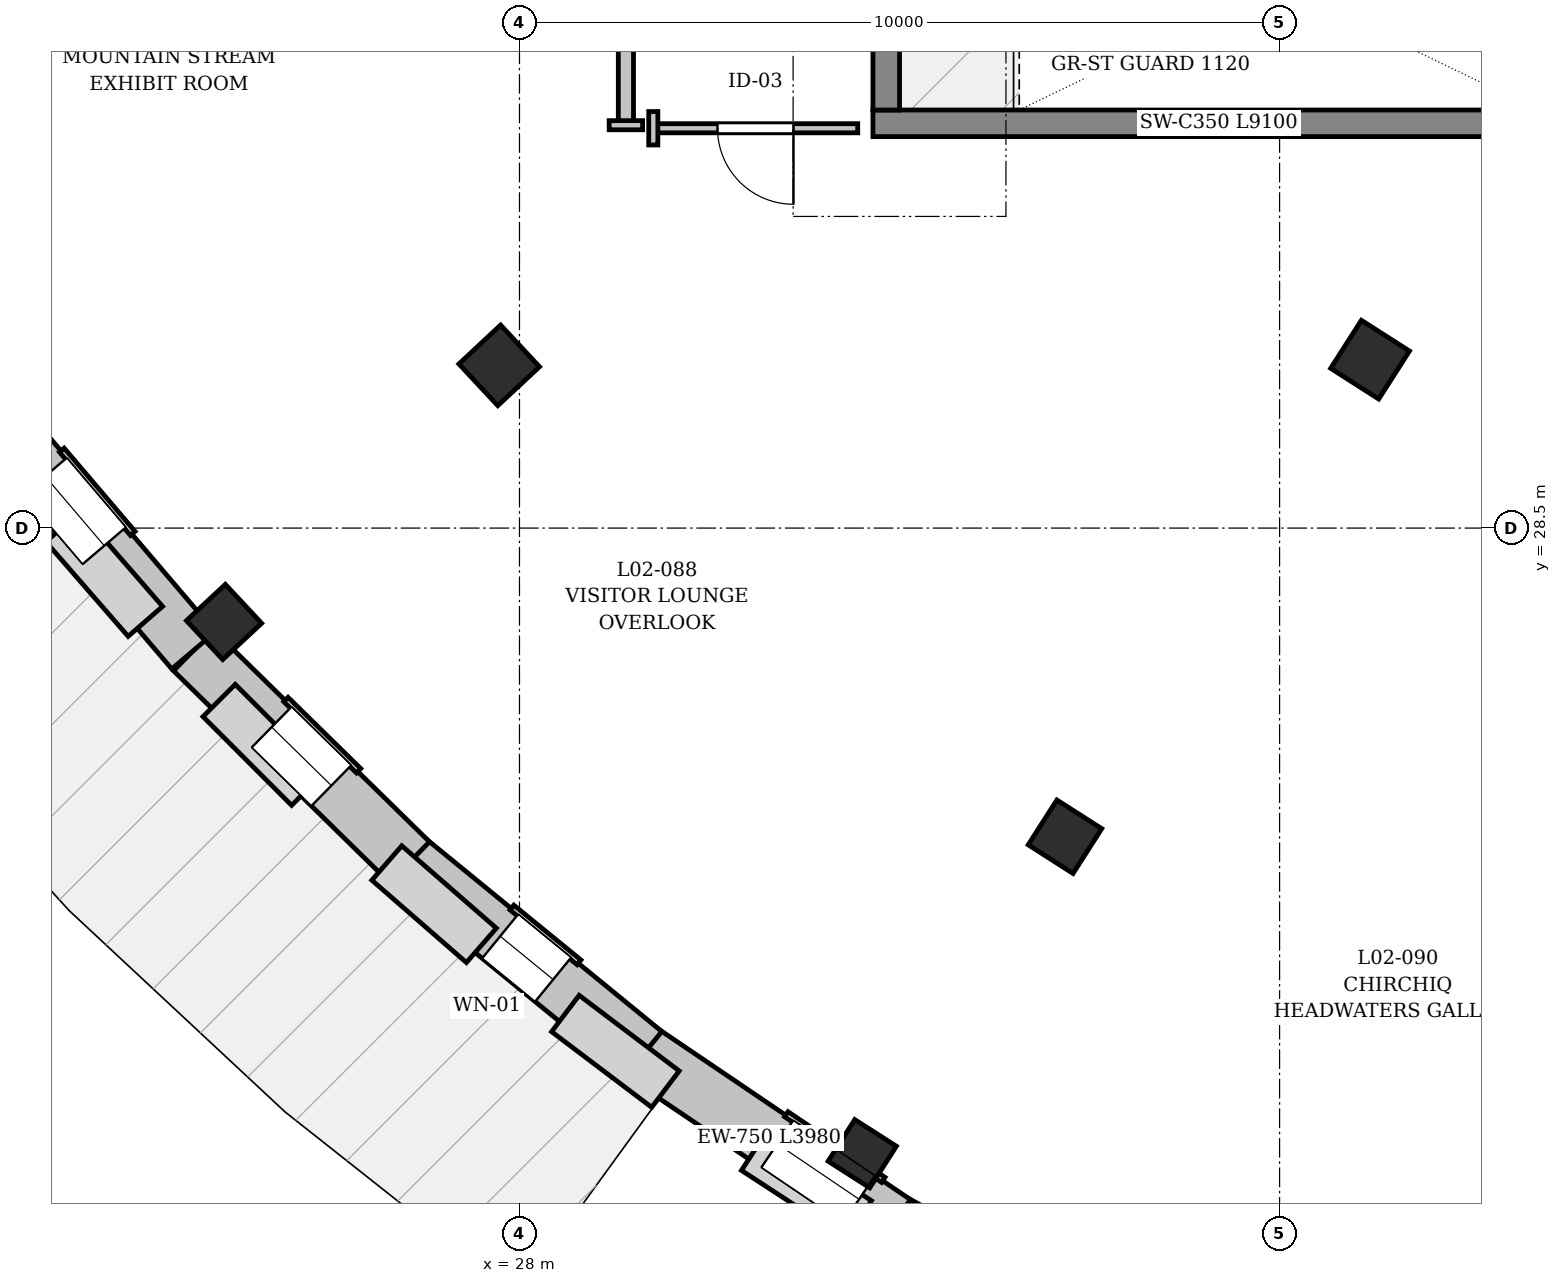
"""IFC4 building model, lengths in metres.
Left out: names, types, materials, properties, quantities, classifications, styles, units other than length and angle.
Written with IfcOpenShell. Run it as: python <this file> out.ifc"""

import sys

from ifc_helpers import new_model, si_unit, direction, frame, frame_2d, origin, origin_2d, place, context, subcontext, project, spatial, rectangle, extrude, element, fill, save


model = new_model("IFC4")
c1 = context("Model", 3, precision=1e-05, world=origin(), true_north=direction((0.0, 1.0)))
c2 = subcontext(c1, "Body", "Model", "MODEL_VIEW")
j1 = project(units=[si_unit("LENGTHUNIT", "METRE"), si_unit("PLANEANGLEUNIT", "RADIAN")], contexts=[c1])
p1 = place(None, origin())
s1 = spatial("IfcSite", under=j1, at=p1, CompositionType="ELEMENT")
p2 = place(p1, origin())
s2 = spatial("IfcBuilding", under=s1, at=p2, CompositionType="ELEMENT")
p3 = place(p2, frame((0.0, 0.0, 5.4)))
s3 = spatial("IfcBuildingStorey", under=s2, at=p3, CompositionType="ELEMENT", Elevation=5.4)
p4 = place(p3, frame((27.733, 30.641, 0.0), z_axis=(0.0, 0.0, 1.0), x_axis=(-0.731353701619, -0.681998360062, 0.0)))
e1 = element("IfcColumn", 1, at=p4, inside=s3, PredefinedType="COLUMN", context=c2, shape_type="SweptSolid", body=[
    extrude(rectangle(XDim=0.75, YDim=0.75, at=origin_2d()), origin(), (0.0, 0.0, 1.0), 4.58),
])
p5 = place(p3, frame((24.113, 27.265, 0.0), z_axis=(0.0, 0.0, 1.0), x_axis=(-0.731353701619, -0.681998360062, 0.0)))
e2 = element("IfcColumn", 2, at=p5, inside=s3, PredefinedType="COLUMN", context=c2, shape_type="SweptSolid", body=[
    extrude(rectangle(XDim=0.7, YDim=0.7, at=origin_2d()), origin(), (0.0, 0.0, 1.0), 4.58),
])
p6 = place(p3, frame((39.19, 30.716, 0.0), z_axis=(0.0, 0.0, 1.0), x_axis=(-0.538770785007, -0.842452397007, 0.0)))
e3 = element("IfcColumn", 3, at=p6, inside=s3, PredefinedType="COLUMN", context=c2, shape_type="SweptSolid", body=[
    extrude(rectangle(XDim=0.75, YDim=0.75, at=origin_2d()), origin(), (0.0, 0.0, 1.0), 4.58),
])
p7 = place(p3, frame((35.177, 24.439, 0.0), z_axis=(0.0, 0.0, 1.0), x_axis=(-0.538770785007, -0.842452397007, 0.0)))
e4 = element("IfcColumn", 4, at=p7, inside=s3, PredefinedType="COLUMN", context=c2, shape_type="SweptSolid", body=[
    extrude(rectangle(XDim=0.7, YDim=0.7, at=origin_2d()), origin(), (0.0, 0.0, 1.0), 4.58),
])
p8 = place(p3, frame((32.51, 20.269, 0.0), z_axis=(0.0, 0.0, 1.0), x_axis=(-0.538770785007, -0.842452397007, 0.0)))
e5 = element("IfcColumn", 5, at=p8, inside=s3, PredefinedType="COLUMN", context=c2, shape_type="SweptSolid", body=[
    extrude(rectangle(XDim=0.65, YDim=0.65, at=origin_2d()), origin(), (0.0, 0.0, 1.0), 4.58),
])
p9 = place(p3, frame((36.416, 17.432, 0.0), z_axis=(0.0, 0.0, 1.0), x_axis=(-0.875332414788, 0.483521626839, 0.0)))
e6 = element("IfcWall", 6, at=p9, inside=s3, PredefinedType="SOLIDWALL", context=c2, shape_type="SweptSolid", body=[
    extrude(rectangle(XDim=3.98, YDim=0.75, at=frame_2d((1.99, 0.0))), origin(), (0.0, 0.0, 1.0), 7.932),
])
p10 = place(p9, frame((1.49, 0.0, 0.75)))
e7 = element("IfcOpeningElement", 7, at=p10, cuts=e6, PredefinedType="OPENING", context=c2, shape_type="SweptSolid", body=[
    extrude(rectangle(XDim=1.0, YDim=2.3, at=frame_2d((0.5, 1.15))), frame((0.0, 0.385, 0.0), z_axis=(0.0, -1.0, 0.0), x_axis=(1.0, 0.0, 0.0)), (0.0, 0.0, 1.0), 0.77),
])
p11 = place(p3, frame((32.932, 19.356, 0.0), z_axis=(0.0, 0.0, 1.0), x_axis=(-0.828246569426, 0.560363828448, 0.0)))
e8 = element("IfcWall", 8, at=p11, inside=s3, PredefinedType="SOLIDWALL", context=c2, shape_type="SweptSolid", body=[
    extrude(rectangle(XDim=3.98, YDim=0.75, at=frame_2d((1.99, 0.0))), origin(), (0.0, 0.0, 1.0), 4.803),
])
p12 = place(p11, frame((0.56, 0.0, 0.75)))
e9 = element("IfcOpeningElement", 9, at=p12, cuts=e8, PredefinedType="OPENING", context=c2, shape_type="SweptSolid", body=[
    extrude(rectangle(XDim=1.3, YDim=2.2, at=frame_2d((0.65, 1.1))), frame((0.0, 0.385, 0.0), z_axis=(0.0, -1.0, 0.0), x_axis=(1.0, 0.0, 0.0)), (0.0, 0.0, 1.0), 0.77),
])
p13 = place(p3, frame((29.635, 21.586, 0.0), z_axis=(0.0, 0.0, 1.0), x_axis=(-0.77437531836, 0.632726533595, 0.0)))
e10 = element("IfcWall", 10, at=p13, inside=s3, PredefinedType="SOLIDWALL", context=c2, shape_type="SweptSolid", body=[
    extrude(rectangle(XDim=3.98, YDim=0.75, at=frame_2d((1.99, 0.0))), origin(), (0.0, 0.0, 1.0), 7.932),
])
p14 = place(p13, frame((1.54, 0.0, 0.75)))
e11 = element("IfcOpeningElement", 11, at=p14, cuts=e10, PredefinedType="OPENING", context=c2, shape_type="SweptSolid", body=[
    extrude(rectangle(XDim=0.9, YDim=2.4, at=frame_2d((0.45, 1.2))), frame((0.0, 0.385, 0.0), z_axis=(0.0, -1.0, 0.0), x_axis=(1.0, 0.0, 0.0)), (0.0, 0.0, 1.0), 0.77),
])
p15 = place(p3, frame((26.554, 24.104, 0.0), z_axis=(0.0, 0.0, 1.0), x_axis=(-0.71427784637, 0.699862242291, 0.0)))
e12 = element("IfcWall", 12, at=p15, inside=s3, PredefinedType="SOLIDWALL", context=c2, shape_type="SweptSolid", body=[
    extrude(rectangle(XDim=3.98, YDim=0.75, at=frame_2d((1.99, 0.0))), origin(), (0.0, 0.0, 1.0), 4.753),
])
p16 = place(p15, frame((1.44, 0.0, 0.75)))
e13 = element("IfcOpeningElement", 13, at=p16, cuts=e12, PredefinedType="OPENING", context=c2, shape_type="SweptSolid", body=[
    extrude(rectangle(XDim=1.1, YDim=2.4, at=frame_2d((0.55, 1.2))), frame((0.0, 0.385, 0.0), z_axis=(0.0, -1.0, 0.0), x_axis=(1.0, 0.0, 0.0)), (0.0, 0.0, 1.0), 0.77),
])
p17 = place(p3, frame((23.711, 26.89, 0.0), z_axis=(0.0, 0.0, 1.0), x_axis=(-0.648317673159, 0.761369945998, 0.0)))
e14 = element("IfcWall", 14, at=p17, inside=s3, PredefinedType="SOLIDWALL", context=c2, shape_type="SweptSolid", body=[
    extrude(rectangle(XDim=3.98, YDim=0.75, at=frame_2d((1.99, 0.0))), origin(), (0.0, 0.0, 1.0), 4.753),
])
p18 = place(p17, frame((1.81, 0.0, 0.75)))
e15 = element("IfcOpeningElement", 15, at=p18, cuts=e14, PredefinedType="OPENING", context=c2, shape_type="SweptSolid", body=[
    extrude(rectangle(XDim=1.2, YDim=2.2, at=frame_2d((0.6, 1.1))), frame((0.0, 0.385, 0.0), z_axis=(0.0, -1.0, 0.0), x_axis=(1.0, 0.0, 0.0)), (0.0, 0.0, 1.0), 0.77),
])
p19 = place(p3, frame((32.65, 33.825, 0.0), z_axis=(0.0, 0.0, 1.0), x_axis=(1.0, 0.0, 0.0)))
e16 = element("IfcWall", 16, at=p19, inside=s3, PredefinedType="SHEAR", context=c2, shape_type="SweptSolid", body=[
    extrude(rectangle(XDim=9.1, YDim=0.35, at=frame_2d((4.55, 0.0))), origin(), (0.0, 0.0, 1.0), 3.6),
])
p20 = place(p3, frame((32.825, 37.3, 0.0), z_axis=(0.0, 0.0, 1.0), x_axis=(0.0, -1.0, 0.0)))
e17 = element("IfcWall", 17, at=p20, inside=s3, PredefinedType="SHEAR", context=c2, shape_type="SweptSolid", body=[
    extrude(rectangle(XDim=3.3, YDim=0.35, at=frame_2d((1.65, 0.0))), origin(), (0.0, 0.0, 1.0), 3.6),
])
p21 = place(p20, frame((0.28, 0.0, 0.0)))
e18 = element("IfcOpeningElement", 18, at=p21, cuts=e17, PredefinedType="OPENING", context=c2, shape_type="SweptSolid", body=[
    extrude(rectangle(XDim=1.25, YDim=2.2, at=frame_2d((0.625, 1.1))), frame((0.0, 0.185, 0.0), z_axis=(0.0, -1.0, 0.0), x_axis=(1.0, 0.0, 0.0)), (0.0, 0.0, 1.0), 0.37),
])
p22 = place(p3, frame((29.4, 37.5, 0.0), z_axis=(0.0, 0.0, 1.0), x_axis=(0.0, -1.0, 0.0)))
e19 = element("IfcWall", 19, at=p22, inside=s3, PredefinedType="PARTITIONING", context=c2, shape_type="SweptSolid", body=[
    extrude(rectangle(XDim=3.7, YDim=0.2, at=frame_2d((1.85, 0.0))), origin(), (0.0, 0.0, 1.0), 3.55),
])
p23 = place(p22, frame((1.225, 0.0, 0.0)))
e20 = element("IfcOpeningElement", 20, at=p23, cuts=e19, PredefinedType="OPENING", context=c2, shape_type="SweptSolid", body=[
    extrude(rectangle(XDim=1.25, YDim=2.2, at=frame_2d((0.625, 1.1))), frame((0.0, 0.11, 0.0), z_axis=(0.0, -1.0, 0.0), x_axis=(1.0, 0.0, 0.0)), (0.0, 0.0, 1.0), 0.22),
])
p24 = place(p3, frame((32.45, 33.76, 0.0), z_axis=(0.0, 0.0, 1.0), x_axis=(-1.0, 0.0, 0.0)))
e21 = element("IfcWall", 21, at=p24, inside=s3, PredefinedType="PARTITIONING", context=c2, shape_type="SweptSolid", body=[
    extrude(rectangle(XDim=2.689, YDim=0.12, at=frame_2d((1.345, 0.0))), origin(), (0.0, 0.0, 1.0), 3.55),
])
p25 = place(p24, frame((0.845, 0.0, 0.0)))
e22 = element("IfcOpeningElement", 22, at=p25, cuts=e21, PredefinedType="OPENING", context=c2, shape_type="SweptSolid", body=[
    extrude(rectangle(XDim=1.0, YDim=2.2, at=frame_2d((0.5, 1.1))), frame((0.0, 0.07, 0.0), z_axis=(0.0, -1.0, 0.0), x_axis=(1.0, 0.0, 0.0)), (0.0, 0.0, 1.0), 0.14),
])
p26 = place(p3, frame((29.18, 33.8, 0.0), z_axis=(0.0, 0.0, 1.0), x_axis=(1.0, 0.0, 0.0)))
e23 = element("IfcWall", 23, at=p26, inside=s3, PredefinedType="PARTITIONING", context=c2, shape_type="SweptSolid", body=[
    extrude(rectangle(XDim=0.44, YDim=0.12, at=frame_2d((0.22, 0.0))), origin(), (0.0, 0.0, 1.0), 3.55),
])
p27 = place(p3, frame((29.76, 33.98, 0.0), z_axis=(0.0, 0.0, 1.0), x_axis=(0.0, -1.0, 0.0)))
e24 = element("IfcWall", 24, at=p27, inside=s3, PredefinedType="PARTITIONING", context=c2, shape_type="SweptSolid", body=[
    extrude(rectangle(XDim=0.44, YDim=0.12, at=frame_2d((0.22, 0.0))), origin(), (0.0, 0.0, 1.0), 3.55),
])
p28 = place(p12, origin())
e25 = element("IfcWindow", 25, at=p28, inside=s3, PartitioningType="DOUBLE_PANEL_VERTICAL", PredefinedType="WINDOW", context=c2, shape_type="SweptSolid", body=[
    extrude(rectangle(XDim=1.3, YDim=2.2, at=frame_2d((0.65, 1.1))), frame((0.0, 0.03, 0.0), z_axis=(0.0, -1.0, 0.0), x_axis=(1.0, 0.0, 0.0)), (0.0, 0.0, 1.0), 0.06),
])
fill(e9, e25)
p29 = place(p14, origin())
e26 = element("IfcWindow", 26, at=p29, inside=s3, PartitioningType="SINGLE_PANEL", PredefinedType="WINDOW", context=c2, shape_type="SweptSolid", body=[
    extrude(rectangle(XDim=0.9, YDim=2.4, at=frame_2d((0.45, 1.2))), frame((0.0, 0.03, 0.0), z_axis=(0.0, -1.0, 0.0), x_axis=(1.0, 0.0, 0.0)), (0.0, 0.0, 1.0), 0.06),
])
fill(e11, e26)
p30 = place(p16, origin())
e27 = element("IfcWindow", 27, at=p30, inside=s3, PartitioningType="SINGLE_PANEL", PredefinedType="WINDOW", context=c2, shape_type="SweptSolid", body=[
    extrude(rectangle(XDim=1.1, YDim=2.4, at=frame_2d((0.55, 1.2))), frame((0.0, 0.03, 0.0), z_axis=(0.0, -1.0, 0.0), x_axis=(1.0, 0.0, 0.0)), (0.0, 0.0, 1.0), 0.06),
])
fill(e13, e27)
p31 = place(p18, origin())
e28 = element("IfcWindow", 28, at=p31, inside=s3, PartitioningType="DOUBLE_PANEL_VERTICAL", PredefinedType="WINDOW", context=c2, shape_type="SweptSolid", body=[
    extrude(rectangle(XDim=1.2, YDim=2.2, at=frame_2d((0.6, 1.1))), frame((0.0, 0.03, 0.0), z_axis=(0.0, -1.0, 0.0), x_axis=(1.0, 0.0, 0.0)), (0.0, 0.0, 1.0), 0.06),
])
fill(e15, e28)
p32 = place(p25, origin())
e29 = element("IfcDoor", 29, at=p32, inside=s3, OperationType="SINGLE_SWING_RIGHT", PredefinedType="DOOR", context=c2, shape_type="SweptSolid", body=[
    extrude(rectangle(XDim=1.0, YDim=2.2, at=frame_2d((0.5, 1.1))), frame((0.0, 0.025, 0.0), z_axis=(0.0, -1.0, 0.0), x_axis=(1.0, 0.0, 0.0)), (0.0, 0.0, 1.0), 0.05),
])
fill(e22, e29)
save(model, sys.argv[1])
